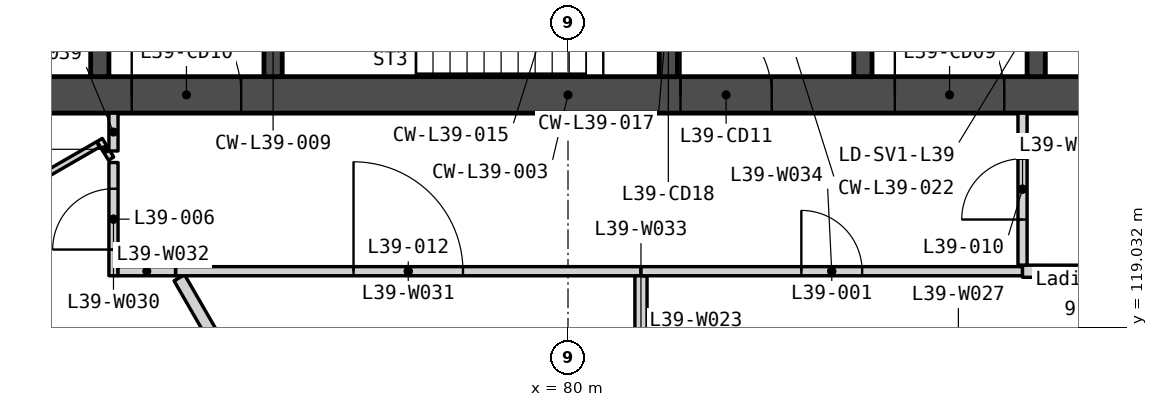
"""IFC4 building model, lengths in metres.
Left out: names, types, materials, properties, quantities, classifications, styles, units other than length and angle.
Written with IfcOpenShell. Run it as: python <this file> out.ifc"""

import sys

from ifc_helpers import new_model, si_unit, direction, frame, frame_2d, origin, place, context, subcontext, project, spatial, polyline, rectangle, outline, extrude, element, fill, save


model = new_model("IFC4")
c1 = context("Model", 3, precision=1e-05, world=origin(), true_north=direction((0.0, 1.0)))
c2 = subcontext(c1, "Body", "Model", "MODEL_VIEW")
j1 = project(units=[si_unit("LENGTHUNIT", "METRE"), si_unit("PLANEANGLEUNIT", "RADIAN")], contexts=[c1])
p1 = place(None, origin())
s1 = spatial("IfcSite", under=j1, at=p1, CompositionType="ELEMENT")
p2 = place(p1, origin())
s2 = spatial("IfcBuilding", under=s1, at=p2, CompositionType="ELEMENT")
p3 = place(p2, frame((0.0, 0.0, 155.9)))
s3 = spatial("IfcBuildingStorey", under=s2, at=p3, CompositionType="ELEMENT", Elevation=155.9)
p4 = place(p3, frame((69.0, 122.85, 0.0), z_axis=(0.0, 0.0, 1.0), x_axis=(1.0, 0.0, 0.0)))
e1 = element("IfcWall", 1, at=p4, inside=s3, PredefinedType="SOLIDWALL", context=c2, shape_type="SweptSolid", body=[
    extrude(rectangle(XDim=22.0, YDim=0.6, at=frame_2d((11.0, 0.0))), origin(), (0.0, 0.0, 1.0), 3.75),
])
p5 = place(p4, frame((16.375, 0.0, 0.0)))
e2 = element("IfcOpeningElement", 2, at=p5, cuts=e1, PredefinedType="OPENING", context=c2, shape_type="SweptSolid", body=[
    extrude(rectangle(XDim=1.8, YDim=2.1, at=frame_2d((0.9, 1.05))), frame((0.0, 0.31, 0.0), z_axis=(0.0, -1.0, 0.0), x_axis=(1.0, 0.0, 0.0)), (0.0, 0.0, 1.0), 0.62),
])
p6 = place(p4, frame((3.825, 0.0, 0.0)))
e3 = element("IfcOpeningElement", 3, at=p6, cuts=e1, PredefinedType="OPENING", context=c2, shape_type="SweptSolid", body=[
    extrude(rectangle(XDim=1.8, YDim=2.1, at=frame_2d((0.9, 1.05))), frame((0.0, 0.31, 0.0), z_axis=(0.0, -1.0, 0.0), x_axis=(1.0, 0.0, 0.0)), (0.0, 0.0, 1.0), 0.62),
])
p7 = place(p4, frame((12.85, 0.0, 0.0)))
e4 = element("IfcOpeningElement", 4, at=p7, cuts=e1, PredefinedType="OPENING", context=c2, shape_type="SweptSolid", body=[
    extrude(rectangle(XDim=1.5, YDim=2.1, at=frame_2d((0.75, 1.05))), frame((0.0, 0.31, 0.0), z_axis=(0.0, -1.0, 0.0), x_axis=(1.0, 0.0, 0.0)), (0.0, 0.0, 1.0), 0.62),
])
p8 = place(p3, frame((72.3, 133.95, 0.0), z_axis=(0.0, 0.0, 1.0), x_axis=(0.0, -1.0, 0.0)))
e5 = element("IfcWall", 5, at=p8, inside=s3, PredefinedType="SOLIDWALL", context=c2, shape_type="SweptSolid", body=[
    extrude(rectangle(XDim=10.8, YDim=0.3, at=frame_2d((5.4, 0.0))), origin(), (0.0, 0.0, 1.0), 3.75),
])
p9 = place(p8, frame((6.95, 0.0, 0.0)))
e6 = element("IfcOpeningElement", 6, at=p9, cuts=e5, PredefinedType="OPENING", context=c2, shape_type="SweptSolid", body=[
    extrude(rectangle(XDim=1.1, YDim=2.1, at=frame_2d((0.55, 1.05))), frame((0.0, 0.16, 0.0), z_axis=(0.0, -1.0, 0.0), x_axis=(1.0, 0.0, 0.0)), (0.0, 0.0, 1.0), 0.32),
])
p10 = place(p8, frame((9.35, 0.0, 0.0)))
e7 = element("IfcOpeningElement", 7, at=p10, cuts=e5, PredefinedType="OPENING", context=c2, shape_type="SweptSolid", body=[
    extrude(rectangle(XDim=0.9, YDim=2.1, at=frame_2d((0.45, 1.05))), frame((0.0, 0.16, 0.0), z_axis=(0.0, -1.0, 0.0), x_axis=(1.0, 0.0, 0.0)), (0.0, 0.0, 1.0), 0.32),
])
p11 = place(p8, frame((5.1, 0.0, 0.0)))
e8 = element("IfcOpeningElement", 8, at=p11, cuts=e5, PredefinedType="OPENING", context=c2, shape_type="SweptSolid", body=[
    extrude(rectangle(XDim=1.0, YDim=2.1, at=frame_2d((0.5, 1.05))), frame((0.0, 0.16, 0.0), z_axis=(0.0, -1.0, 0.0), x_axis=(1.0, 0.0, 0.0)), (0.0, 0.0, 1.0), 0.32),
])
p12 = place(p3, frame((75.15, 125.7, 0.0), z_axis=(0.0, 0.0, 1.0), x_axis=(0.0, -1.0, 0.0)))
e9 = element("IfcWall", 9, at=p12, inside=s3, PredefinedType="SOLIDWALL", context=c2, shape_type="SweptSolid", body=[
    extrude(rectangle(XDim=2.55, YDim=0.3, at=frame_2d((1.275, 0.0))), origin(), (0.0, 0.0, 1.0), 3.75),
])
p13 = place(p3, frame((81.65, 125.7, 0.0), z_axis=(0.0, 0.0, 1.0), x_axis=(0.0, -1.0, 0.0)))
e10 = element("IfcWall", 10, at=p13, inside=s3, PredefinedType="SOLIDWALL", context=c2, shape_type="SweptSolid", body=[
    extrude(rectangle(XDim=2.55, YDim=0.3, at=frame_2d((1.275, 0.0))), origin(), (0.0, 0.0, 1.0), 3.75),
])
p14 = place(p13, frame((0.75, 0.0, 0.0)))
e11 = element("IfcOpeningElement", 11, at=p14, cuts=e10, PredefinedType="OPENING", context=c2, shape_type="SweptSolid", body=[
    extrude(rectangle(XDim=1.0, YDim=2.1, at=frame_2d((0.5, 1.05))), frame((0.0, 0.16, 0.0), z_axis=(0.0, -1.0, 0.0), x_axis=(1.0, 0.0, 0.0)), (0.0, 0.0, 1.0), 0.32),
])
p15 = place(p3, frame((84.85, 125.85, 0.0), z_axis=(0.0, 0.0, 1.0), x_axis=(0.0, -1.0, 0.0)))
e12 = element("IfcWall", 12, at=p15, inside=s3, PredefinedType="SOLIDWALL", context=c2, shape_type="SweptSolid", body=[
    extrude(rectangle(XDim=2.7, YDim=0.3, at=frame_2d((1.35, 0.0))), origin(), (0.0, 0.0, 1.0), 3.75),
])
p16 = place(p3, frame((87.7, 133.95, 0.0), z_axis=(0.0, 0.0, 1.0), x_axis=(0.0, -1.0, 0.0)))
e13 = element("IfcWall", 13, at=p16, inside=s3, PredefinedType="SOLIDWALL", context=c2, shape_type="SweptSolid", body=[
    extrude(rectangle(XDim=10.8, YDim=0.3, at=frame_2d((5.4, 0.0))), origin(), (0.0, 0.0, 1.0), 3.75),
])
p17 = place(p16, frame((6.95, 0.0, 0.0)))
e14 = element("IfcOpeningElement", 14, at=p17, cuts=e13, PredefinedType="OPENING", context=c2, shape_type="SweptSolid", body=[
    extrude(rectangle(XDim=1.1, YDim=2.1, at=frame_2d((0.55, 1.05))), frame((0.0, 0.16, 0.0), z_axis=(0.0, -1.0, 0.0), x_axis=(1.0, 0.0, 0.0)), (0.0, 0.0, 1.0), 0.32),
])
p18 = place(p16, frame((5.1, 0.0, 0.0)))
e15 = element("IfcOpeningElement", 15, at=p18, cuts=e13, PredefinedType="OPENING", context=c2, shape_type="SweptSolid", body=[
    extrude(rectangle(XDim=1.0, YDim=2.1, at=frame_2d((0.5, 1.05))), frame((0.0, 0.16, 0.0), z_axis=(0.0, -1.0, 0.0), x_axis=(1.0, 0.0, 0.0)), (0.0, 0.0, 1.0), 0.32),
])
p19 = place(p16, frame((9.25, 0.0, 0.0)))
e16 = element("IfcOpeningElement", 16, at=p19, cuts=e13, PredefinedType="OPENING", context=c2, shape_type="SweptSolid", body=[
    extrude(rectangle(XDim=1.1, YDim=2.1, at=frame_2d((0.55, 1.05))), frame((0.0, 0.16, 0.0), z_axis=(0.0, -1.0, 0.0), x_axis=(1.0, 0.0, 0.0)), (0.0, 0.0, 1.0), 0.32),
])
p20 = place(p3, frame((57.652, 131.129, -0.15), z_axis=(0.0, 0.0, 1.0), x_axis=(0.499997369791, -0.866026922331, 0.0)))
e17 = element("IfcWall", 17, at=p20, inside=s3, PredefinedType="SOLIDWALL", context=c2, shape_type="SweptSolid", body=[
    extrude(outline(polyline([(40.486, 0.0), (40.486, 3.9), (0.0, 3.9), (0.0, 0.0), (40.486, 0.0)])), frame((0.0, 0.225, 0.0), z_axis=(0.0, -1.0, 0.0), x_axis=(1.0, 0.0, 0.0)), (0.0, 0.0, 1.0), 0.45),
])
p21 = place(p20, frame((3.011, 0.0, 0.95)))
e18 = element("IfcOpeningElement", 18, at=p21, cuts=e17, PredefinedType="OPENING", context=c2, shape_type="SweptSolid", body=[
    extrude(rectangle(XDim=1.8, YDim=2.2, at=frame_2d((0.9, 1.1))), frame((0.0, 0.235, 0.0), z_axis=(0.0, -1.0, 0.0), x_axis=(1.0, 0.0, 0.0)), (0.0, 0.0, 1.0), 0.47),
])
p22 = place(p20, frame((5.311, 0.0, 0.95)))
e19 = element("IfcOpeningElement", 19, at=p22, cuts=e17, PredefinedType="OPENING", context=c2, shape_type="SweptSolid", body=[
    extrude(rectangle(XDim=1.8, YDim=2.2, at=frame_2d((0.9, 1.1))), frame((0.0, 0.235, 0.0), z_axis=(0.0, -1.0, 0.0), x_axis=(1.0, 0.0, 0.0)), (0.0, 0.0, 1.0), 0.47),
])
p23 = place(p20, frame((13.132, 0.0, 0.95)))
e20 = element("IfcOpeningElement", 20, at=p23, cuts=e17, PredefinedType="OPENING", context=c2, shape_type="SweptSolid", body=[
    extrude(rectangle(XDim=1.8, YDim=2.2, at=frame_2d((0.9, 1.1))), frame((0.0, 0.235, 0.0), z_axis=(0.0, -1.0, 0.0), x_axis=(1.0, 0.0, 0.0)), (0.0, 0.0, 1.0), 0.47),
])
p24 = place(p20, frame((15.432, 0.0, 0.95)))
e21 = element("IfcOpeningElement", 21, at=p24, cuts=e17, PredefinedType="OPENING", context=c2, shape_type="SweptSolid", body=[
    extrude(rectangle(XDim=1.8, YDim=2.2, at=frame_2d((0.9, 1.1))), frame((0.0, 0.235, 0.0), z_axis=(0.0, -1.0, 0.0), x_axis=(1.0, 0.0, 0.0)), (0.0, 0.0, 1.0), 0.47),
])
p25 = place(p20, frame((23.254, 0.0, 0.95)))
e22 = element("IfcOpeningElement", 22, at=p25, cuts=e17, PredefinedType="OPENING", context=c2, shape_type="SweptSolid", body=[
    extrude(rectangle(XDim=1.8, YDim=2.2, at=frame_2d((0.9, 1.1))), frame((0.0, 0.235, 0.0), z_axis=(0.0, -1.0, 0.0), x_axis=(1.0, 0.0, 0.0)), (0.0, 0.0, 1.0), 0.47),
])
p26 = place(p20, frame((25.554, 0.0, 0.95)))
e23 = element("IfcOpeningElement", 23, at=p26, cuts=e17, PredefinedType="OPENING", context=c2, shape_type="SweptSolid", body=[
    extrude(rectangle(XDim=1.8, YDim=2.2, at=frame_2d((0.9, 1.1))), frame((0.0, 0.235, 0.0), z_axis=(0.0, -1.0, 0.0), x_axis=(1.0, 0.0, 0.0)), (0.0, 0.0, 1.0), 0.47),
])
p27 = place(p20, frame((33.375, 0.0, 0.95)))
e24 = element("IfcOpeningElement", 24, at=p27, cuts=e17, PredefinedType="OPENING", context=c2, shape_type="SweptSolid", body=[
    extrude(rectangle(XDim=1.8, YDim=2.2, at=frame_2d((0.9, 1.1))), frame((0.0, 0.235, 0.0), z_axis=(0.0, -1.0, 0.0), x_axis=(1.0, 0.0, 0.0)), (0.0, 0.0, 1.0), 0.47),
])
p28 = place(p20, frame((35.675, 0.0, 0.95)))
e25 = element("IfcOpeningElement", 25, at=p28, cuts=e17, PredefinedType="OPENING", context=c2, shape_type="SweptSolid", body=[
    extrude(rectangle(XDim=1.8, YDim=2.2, at=frame_2d((0.9, 1.1))), frame((0.0, 0.235, 0.0), z_axis=(0.0, -1.0, 0.0), x_axis=(1.0, 0.0, 0.0)), (0.0, 0.0, 1.0), 0.47),
])
p29 = place(p3, frame((82.105, 96.067, -0.15), z_axis=(0.0, 0.0, 1.0), x_axis=(0.499997369791, 0.866026922331, 0.0)))
e26 = element("IfcWall", 26, at=p29, inside=s3, PredefinedType="SOLIDWALL", context=c2, shape_type="SweptSolid", body=[
    extrude(outline(polyline([(40.486, 0.0), (40.486, 3.9), (0.0, 3.9), (0.0, 0.0), (40.486, 0.0)])), frame((0.0, 0.225, 0.0), z_axis=(0.0, -1.0, 0.0), x_axis=(1.0, 0.0, 0.0)), (0.0, 0.0, 1.0), 0.45),
])
p30 = place(p29, frame((3.011, 0.0, 0.95)))
e27 = element("IfcOpeningElement", 27, at=p30, cuts=e26, PredefinedType="OPENING", context=c2, shape_type="SweptSolid", body=[
    extrude(rectangle(XDim=1.8, YDim=2.2, at=frame_2d((0.9, 1.1))), frame((0.0, 0.235, 0.0), z_axis=(0.0, -1.0, 0.0), x_axis=(1.0, 0.0, 0.0)), (0.0, 0.0, 1.0), 0.47),
])
p31 = place(p29, frame((5.311, 0.0, 0.95)))
e28 = element("IfcOpeningElement", 28, at=p31, cuts=e26, PredefinedType="OPENING", context=c2, shape_type="SweptSolid", body=[
    extrude(rectangle(XDim=1.8, YDim=2.2, at=frame_2d((0.9, 1.1))), frame((0.0, 0.235, 0.0), z_axis=(0.0, -1.0, 0.0), x_axis=(1.0, 0.0, 0.0)), (0.0, 0.0, 1.0), 0.47),
])
p32 = place(p29, frame((13.132, 0.0, 0.95)))
e29 = element("IfcOpeningElement", 29, at=p32, cuts=e26, PredefinedType="OPENING", context=c2, shape_type="SweptSolid", body=[
    extrude(rectangle(XDim=1.8, YDim=2.2, at=frame_2d((0.9, 1.1))), frame((0.0, 0.235, 0.0), z_axis=(0.0, -1.0, 0.0), x_axis=(1.0, 0.0, 0.0)), (0.0, 0.0, 1.0), 0.47),
])
p33 = place(p29, frame((15.432, 0.0, 0.95)))
e30 = element("IfcOpeningElement", 30, at=p33, cuts=e26, PredefinedType="OPENING", context=c2, shape_type="SweptSolid", body=[
    extrude(rectangle(XDim=1.8, YDim=2.2, at=frame_2d((0.9, 1.1))), frame((0.0, 0.235, 0.0), z_axis=(0.0, -1.0, 0.0), x_axis=(1.0, 0.0, 0.0)), (0.0, 0.0, 1.0), 0.47),
])
p34 = place(p29, frame((23.254, 0.0, 0.95)))
e31 = element("IfcOpeningElement", 31, at=p34, cuts=e26, PredefinedType="OPENING", context=c2, shape_type="SweptSolid", body=[
    extrude(rectangle(XDim=1.8, YDim=2.2, at=frame_2d((0.9, 1.1))), frame((0.0, 0.235, 0.0), z_axis=(0.0, -1.0, 0.0), x_axis=(1.0, 0.0, 0.0)), (0.0, 0.0, 1.0), 0.47),
])
p35 = place(p29, frame((25.554, 0.0, 0.95)))
e32 = element("IfcOpeningElement", 32, at=p35, cuts=e26, PredefinedType="OPENING", context=c2, shape_type="SweptSolid", body=[
    extrude(rectangle(XDim=1.8, YDim=2.2, at=frame_2d((0.9, 1.1))), frame((0.0, 0.235, 0.0), z_axis=(0.0, -1.0, 0.0), x_axis=(1.0, 0.0, 0.0)), (0.0, 0.0, 1.0), 0.47),
])
p36 = place(p29, frame((33.375, 0.0, 0.95)))
e33 = element("IfcOpeningElement", 33, at=p36, cuts=e26, PredefinedType="OPENING", context=c2, shape_type="SweptSolid", body=[
    extrude(rectangle(XDim=1.8, YDim=2.2, at=frame_2d((0.9, 1.1))), frame((0.0, 0.235, 0.0), z_axis=(0.0, -1.0, 0.0), x_axis=(1.0, 0.0, 0.0)), (0.0, 0.0, 1.0), 0.47),
])
p37 = place(p29, frame((35.675, 0.0, 0.95)))
e34 = element("IfcOpeningElement", 34, at=p37, cuts=e26, PredefinedType="OPENING", context=c2, shape_type="SweptSolid", body=[
    extrude(rectangle(XDim=1.8, YDim=2.2, at=frame_2d((0.9, 1.1))), frame((0.0, 0.235, 0.0), z_axis=(0.0, -1.0, 0.0), x_axis=(1.0, 0.0, 0.0)), (0.0, 0.0, 1.0), 0.47),
])
p38 = place(p3, frame((73.608, 119.842, 0.0), z_axis=(0.0, 0.0, 1.0), x_axis=(0.50001949124, -0.86601415022, 0.0)))
e35 = element("IfcWall", 35, at=p38, inside=s3, PredefinedType="PARTITIONING", context=c2, shape_type="SweptSolid", body=[
    extrude(rectangle(XDim=2.49, YDim=0.2, at=frame_2d((1.245, 0.0))), origin(), (0.0, 0.0, 1.0), 3.75),
])
p39 = place(p3, frame((72.525, 119.875, 0.0), z_axis=(0.0, 0.0, 1.0), x_axis=(0.0, 1.0, 0.0)))
e36 = element("IfcWall", 36, at=p39, inside=s3, PredefinedType="PARTITIONING", context=c2, shape_type="SweptSolid", body=[
    extrude(rectangle(XDim=1.863, YDim=0.15, at=frame_2d((0.931, 0.0))), origin(), (0.0, 0.0, 1.0), 3.75),
])
p40 = place(p39, frame((0.431, 0.0, 0.0)))
e37 = element("IfcOpeningElement", 37, at=p40, cuts=e36, PredefinedType="OPENING", context=c2, shape_type="SweptSolid", body=[
    extrude(rectangle(XDim=1.0, YDim=2.1, at=frame_2d((0.5, 1.05))), frame((0.0, 0.085, 0.0), z_axis=(0.0, -1.0, 0.0), x_axis=(1.0, 0.0, 0.0)), (0.0, 0.0, 1.0), 0.17),
])
p41 = place(p3, frame((73.545, 119.95, 0.0), z_axis=(0.0, 0.0, 1.0), x_axis=(1.0, 0.0, 0.0)))
e38 = element("IfcWall", 38, at=p41, inside=s3, PredefinedType="PARTITIONING", context=c2, shape_type="SweptSolid", body=[
    extrude(rectangle(XDim=7.655, YDim=0.15, at=frame_2d((3.827, 0.0))), origin(), (0.0, 0.0, 1.0), 3.75),
])
p42 = place(p41, frame((2.927, 0.0, 0.0)))
e39 = element("IfcOpeningElement", 39, at=p42, cuts=e38, PredefinedType="OPENING", context=c2, shape_type="SweptSolid", body=[
    extrude(rectangle(XDim=1.8, YDim=2.1, at=frame_2d((0.9, 1.05))), frame((0.0, 0.085, 0.0), z_axis=(0.0, -1.0, 0.0), x_axis=(1.0, 0.0, 0.0)), (0.0, 0.0, 1.0), 0.17),
])
p43 = place(p3, frame((72.6, 119.95, 0.0), z_axis=(0.0, 0.0, 1.0), x_axis=(1.0, 0.0, 0.0)))
e40 = element("IfcWall", 40, at=p43, inside=s3, PredefinedType="PARTITIONING", context=c2, shape_type="SweptSolid", body=[
    extrude(rectangle(XDim=0.945, YDim=0.15, at=frame_2d((0.473, 0.0))), origin(), (0.0, 0.0, 1.0), 3.75),
])
p44 = place(p3, frame((81.2, 117.75, 0.0), z_axis=(0.0, 0.0, 1.0), x_axis=(0.0, 1.0, 0.0)))
e41 = element("IfcWall", 41, at=p44, inside=s3, PredefinedType="PARTITIONING", context=c2, shape_type="SweptSolid", body=[
    extrude(rectangle(XDim=2.125, YDim=0.2, at=frame_2d((1.062, 0.0))), origin(), (0.0, 0.0, 1.0), 3.75),
])
p45 = place(p3, frame((81.2, 119.95, 0.0), z_axis=(0.0, 0.0, 1.0), x_axis=(1.0, 0.0, 0.0)))
e42 = element("IfcWall", 42, at=p45, inside=s3, PredefinedType="PARTITIONING", context=c2, shape_type="SweptSolid", body=[
    extrude(rectangle(XDim=6.275, YDim=0.15, at=frame_2d((3.138, 0.0))), origin(), (0.0, 0.0, 1.0), 3.75),
])
p46 = place(p45, frame((2.637, 0.0, 0.0)))
e43 = element("IfcOpeningElement", 43, at=p46, cuts=e42, PredefinedType="OPENING", context=c2, shape_type="SweptSolid", body=[
    extrude(rectangle(XDim=1.0, YDim=2.1, at=frame_2d((0.5, 1.05))), frame((0.0, 0.085, 0.0), z_axis=(0.0, -1.0, 0.0), x_axis=(1.0, 0.0, 0.0)), (0.0, 0.0, 1.0), 0.17),
])
p47 = place(p3, frame((87.475, 119.95, 0.0), z_axis=(0.0, 0.0, 1.0), x_axis=(0.999999723197, -0.000744047413, 0.0)))
e44 = element("IfcWall", 44, at=p47, inside=s3, PredefinedType="PARTITIONING", context=c2, shape_type="SweptSolid", body=[
    extrude(rectangle(XDim=2.625, YDim=0.2, at=frame_2d((1.312, 0.0))), origin(), (0.0, 0.0, 1.0), 3.75),
])
p48 = place(p3, frame((72.298, 122.109, 0.0), z_axis=(0.0, 0.0, 1.0), x_axis=(0.522244349168, -0.852795895723, 0.0)))
e45 = element("IfcWall", 45, at=p48, inside=s3, PredefinedType="PARTITIONING", context=c2, shape_type="SweptSolid", body=[
    extrude(rectangle(XDim=0.36, YDim=0.1, at=frame_2d((0.18, 0.0))), origin(), (0.0, 0.0, 1.0), 3.75),
])
p49 = place(p3, frame((65.439, 118.094, 0.0), z_axis=(0.0, 0.0, 1.0), x_axis=(0.866161367057, 0.499764430726, 0.0)))
e46 = element("IfcWall", 46, at=p49, inside=s3, PredefinedType="PARTITIONING", context=c2, shape_type="SweptSolid", body=[
    extrude(rectangle(XDim=7.888, YDim=0.1, at=frame_2d((3.944, 0.0))), origin(), (0.0, 0.0, 1.0), 3.75),
])
p50 = place(p49, frame((3.494, 0.0, 0.0)))
e47 = element("IfcOpeningElement", 47, at=p50, cuts=e46, PredefinedType="OPENING", context=c2, shape_type="SweptSolid", body=[
    extrude(rectangle(XDim=0.9, YDim=2.1, at=frame_2d((0.45, 1.05))), frame((0.0, 0.06, 0.0), z_axis=(0.0, -1.0, 0.0), x_axis=(1.0, 0.0, 0.0)), (0.0, 0.0, 1.0), 0.12),
])
p51 = place(p3, frame((72.525, 121.927, 0.0), z_axis=(0.0, 0.0, 1.0), x_axis=(0.0, 1.0, 0.0)))
e48 = element("IfcWall", 48, at=p51, inside=s3, PredefinedType="PARTITIONING", context=c2, shape_type="SweptSolid", body=[
    extrude(rectangle(XDim=0.622, YDim=0.15, at=frame_2d((0.311, 0.0))), origin(), (0.0, 0.0, 1.0), 3.75),
])
p52 = place(p3, frame((87.475, 120.05, 0.0), z_axis=(0.0, 0.0, 1.0), x_axis=(0.0, 1.0, 0.0)))
e49 = element("IfcWall", 49, at=p52, inside=s3, PredefinedType="PARTITIONING", context=c2, shape_type="SweptSolid", body=[
    extrude(rectangle(XDim=2.5, YDim=0.15, at=frame_2d((1.25, 0.0))), origin(), (0.0, 0.0, 1.0), 3.75),
])
p53 = place(p52, frame((0.75, 0.0, 0.0)))
e50 = element("IfcOpeningElement", 50, at=p53, cuts=e49, PredefinedType="OPENING", context=c2, shape_type="SweptSolid", body=[
    extrude(rectangle(XDim=1.0, YDim=2.1, at=frame_2d((0.5, 1.05))), frame((0.0, 0.085, 0.0), z_axis=(0.0, -1.0, 0.0), x_axis=(1.0, 0.0, 0.0)), (0.0, 0.0, 1.0), 0.17),
])
p54 = place(p5, origin())
e51 = element("IfcDoor", 51, at=p54, inside=s3, OperationType="DOUBLE_DOOR_DOUBLE_SWING", PredefinedType="DOOR", context=c2, shape_type="SweptSolid", body=[
    extrude(rectangle(XDim=1.8, YDim=2.1, at=frame_2d((0.9, 1.05))), frame((0.0, 0.025, 0.0), z_axis=(0.0, -1.0, 0.0), x_axis=(1.0, 0.0, 0.0)), (0.0, 0.0, 1.0), 0.05),
])
fill(e2, e51)
p55 = place(p6, origin())
e52 = element("IfcDoor", 52, at=p55, inside=s3, OperationType="DOUBLE_DOOR_DOUBLE_SWING", PredefinedType="DOOR", context=c2, shape_type="SweptSolid", body=[
    extrude(rectangle(XDim=1.8, YDim=2.1, at=frame_2d((0.9, 1.05))), frame((0.0, 0.025, 0.0), z_axis=(0.0, -1.0, 0.0), x_axis=(1.0, 0.0, 0.0)), (0.0, 0.0, 1.0), 0.05),
])
fill(e3, e52)
p56 = place(p7, origin())
e53 = element("IfcDoor", 53, at=p56, inside=s3, OperationType="DOUBLE_DOOR_DOUBLE_SWING", PredefinedType="DOOR", context=c2, shape_type="SweptSolid", body=[
    extrude(rectangle(XDim=1.5, YDim=2.1, at=frame_2d((0.75, 1.05))), frame((0.0, 0.025, 0.0), z_axis=(0.0, -1.0, 0.0), x_axis=(1.0, 0.0, 0.0)), (0.0, 0.0, 1.0), 0.05),
])
fill(e4, e53)
p57 = place(p46, origin())
e54 = element("IfcDoor", 54, at=p57, inside=s3, OperationType="SINGLE_SWING_LEFT", PredefinedType="DOOR", context=c2, shape_type="SweptSolid", body=[
    extrude(rectangle(XDim=1.0, YDim=2.1, at=frame_2d((0.5, 1.05))), frame((0.0, 0.025, 0.0), z_axis=(0.0, -1.0, 0.0), x_axis=(1.0, 0.0, 0.0)), (0.0, 0.0, 1.0), 0.05),
])
fill(e43, e54)
p58 = place(p40, origin())
e55 = element("IfcDoor", 55, at=p58, inside=s3, OperationType="SINGLE_SWING_LEFT", PredefinedType="DOOR", context=c2, shape_type="SweptSolid", body=[
    extrude(rectangle(XDim=1.0, YDim=2.1, at=frame_2d((0.5, 1.05))), frame((0.0, 0.025, 0.0), z_axis=(0.0, -1.0, 0.0), x_axis=(1.0, 0.0, 0.0)), (0.0, 0.0, 1.0), 0.05),
])
fill(e37, e55)
p59 = place(p53, origin())
e56 = element("IfcDoor", 56, at=p59, inside=s3, OperationType="SINGLE_SWING_LEFT", PredefinedType="DOOR", context=c2, shape_type="SweptSolid", body=[
    extrude(rectangle(XDim=1.0, YDim=2.1, at=frame_2d((0.5, 1.05))), frame((0.0, 0.025, 0.0), z_axis=(0.0, -1.0, 0.0), x_axis=(1.0, 0.0, 0.0)), (0.0, 0.0, 1.0), 0.05),
])
fill(e50, e56)
p60 = place(p42, origin())
e57 = element("IfcDoor", 57, at=p60, inside=s3, OperationType="SINGLE_SWING_LEFT", PredefinedType="DOOR", context=c2, shape_type="SweptSolid", body=[
    extrude(rectangle(XDim=1.8, YDim=2.1, at=frame_2d((0.9, 1.05))), frame((0.0, 0.025, 0.0), z_axis=(0.0, -1.0, 0.0), x_axis=(1.0, 0.0, 0.0)), (0.0, 0.0, 1.0), 0.05),
])
fill(e39, e57)
save(model, sys.argv[1])
